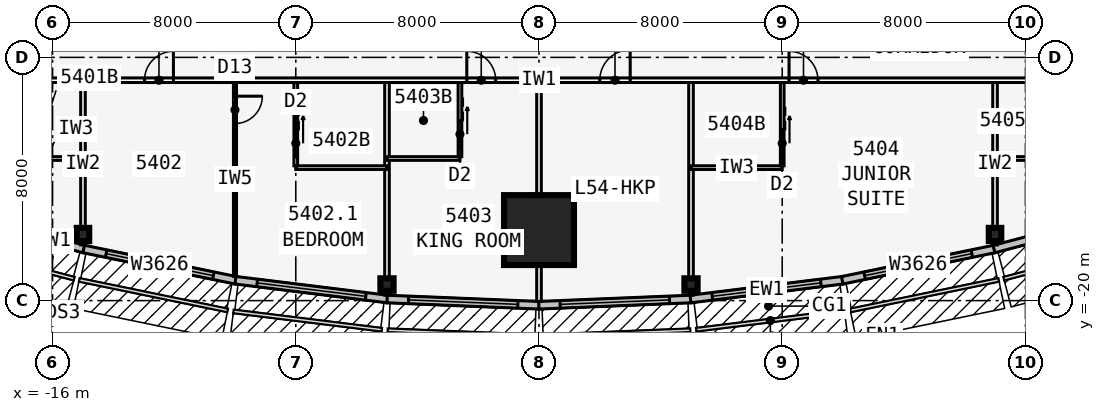
"""IFC4 building model, lengths in metres.
Left out: names, types, materials, properties, quantities, classifications, styles, units other than length and angle.
Written with IfcOpenShell. Run it as: python <this file> out.ifc"""

import sys

from ifc_helpers import new_model, si_unit, direction, frame, frame_2d, origin, origin_2d, place, context, subcontext, project, spatial, rectangle, i_section, extrude, element, fill, save


model = new_model("IFC4")
c1 = context("Model", 3, precision=1e-05, world=origin(), true_north=direction((0.0, 1.0)))
c2 = subcontext(c1, "Body", "Model", "MODEL_VIEW")
j1 = project(units=[si_unit("LENGTHUNIT", "METRE"), si_unit("PLANEANGLEUNIT", "RADIAN")], contexts=[c1])
p1 = place(None, origin())
s1 = spatial("IfcSite", under=j1, at=p1, CompositionType="ELEMENT")
p2 = place(p1, origin())
s2 = spatial("IfcBuilding", under=s1, at=p2, CompositionType="ELEMENT")
p3 = place(p2, frame((0.0, 0.0, 204.5)))
s3 = spatial("IfcBuildingStorey", under=s2, at=p3, CompositionType="ELEMENT", Elevation=204.5)
for number, where, z_axis, x_axis in (
    (1, (-15.0, -17.825, 0.0), (0.0, 0.0, 1.0), (1.0, 0.0, 0.0)),
    (2, (-5.0, -19.472, 0.0), (0.0, 0.0, 1.0), (0.0, -1.0, 0.0)),
    (3, (5.0, -19.472, 0.0), (0.0, 0.0, 1.0), (0.0, -1.0, 0.0)),
    (4, (15.0, -17.825, 0.0), (0.0, 0.0, 1.0), (1.0, 0.0, 0.0)),
):
    element("IfcColumn", number, at=place(p3, frame(where, z_axis=z_axis, x_axis=x_axis)), inside=s3, PredefinedType="COLUMN", context=c2, shape_type="SweptSolid", body=[
        extrude(i_section(OverallWidth=0.411, OverallDepth=0.434, WebThickness=0.036, FlangeThickness=0.057, at=origin_2d()), origin(), (0.0, 0.0, 1.0), 3.6),
    ])
p4 = place(p3, frame((0.0, -17.68, 0.0), z_axis=(0.0, 0.0, 1.0), x_axis=(0.0, -1.0, 0.0)))
e5 = element("IfcColumn", 5, at=p4, inside=s3, PredefinedType="COLUMN", context=c2, shape_type="SweptSolid", body=[
    extrude(rectangle(XDim=2.3, YDim=2.3, at=origin_2d()), origin(), (0.0, 0.0, 1.0), 3.6),
])
p5 = place(p3, frame((-16.968, -17.777, 0.0), z_axis=(0.0, 0.0, 1.0), x_axis=(0.967010286052, -0.254737328772, 0.0)))
e6 = element("IfcWall", 6, at=p5, inside=s3, PredefinedType="STANDARD", context=c2, shape_type="SweptSolid", body=[
    extrude(rectangle(XDim=2.068, YDim=0.25, at=frame_2d((1.034, 0.0))), origin(), (0.0, 0.0, 1.0), 3.435),
])
p6 = place(p3, frame((-14.975, -18.302, 0.0), z_axis=(0.0, 0.0, 1.0), x_axis=(0.979461488189, -0.201631329795, 0.0)))
e7 = element("IfcWall", 7, at=p6, inside=s3, PredefinedType="STANDARD", context=c2, shape_type="SweptSolid", body=[
    extrude(rectangle(XDim=5.105, YDim=0.25, at=frame_2d((2.552, 0.0))), origin(), (0.0, 0.0, 1.0), 3.435),
])
p7 = place(p6, frame((0.752, 0.0, 0.45)))
e8 = element("IfcOpeningElement", 8, at=p7, cuts=e7, PredefinedType="OPENING", context=c2, shape_type="SweptSolid", body=[
    extrude(rectangle(XDim=3.6, YDim=2.6, at=frame_2d((1.8, 1.3))), frame((0.0, 0.135, 0.0), z_axis=(0.0, -1.0, 0.0), x_axis=(1.0, 0.0, 0.0)), (0.0, 0.0, 1.0), 0.27),
])
p8 = place(p3, frame((-9.985, -19.33, 0.0), z_axis=(0.0, 0.0, 1.0), x_axis=(0.992449874964, -0.12265090984, 0.0)))
e9 = element("IfcWall", 9, at=p8, inside=s3, PredefinedType="STANDARD", context=c2, shape_type="SweptSolid", body=[
    extrude(rectangle(XDim=5.038, YDim=0.25, at=frame_2d((2.519, 0.0))), origin(), (0.0, 0.0, 1.0), 3.435),
])
p9 = place(p8, frame((0.719, 0.0, 0.45)))
e10 = element("IfcOpeningElement", 10, at=p9, cuts=e9, PredefinedType="OPENING", context=c2, shape_type="SweptSolid", body=[
    extrude(rectangle(XDim=3.6, YDim=2.6, at=frame_2d((1.8, 1.3))), frame((0.0, 0.135, 0.0), z_axis=(0.0, -1.0, 0.0), x_axis=(1.0, 0.0, 0.0)), (0.0, 0.0, 1.0), 0.27),
])
p10 = place(p3, frame((-4.995, -19.947, 0.0), z_axis=(0.0, 0.0, 1.0), x_axis=(0.999151909423, -0.041175986892, 0.0)))
e11 = element("IfcWall", 11, at=p10, inside=s3, PredefinedType="STANDARD", context=c2, shape_type="SweptSolid", body=[
    extrude(rectangle(XDim=5.004, YDim=0.25, at=frame_2d((2.502, 0.0))), origin(), (0.0, 0.0, 1.0), 3.435),
])
p11 = place(p10, frame((0.702, 0.0, 0.45)))
e12 = element("IfcOpeningElement", 12, at=p11, cuts=e11, PredefinedType="OPENING", context=c2, shape_type="SweptSolid", body=[
    extrude(rectangle(XDim=3.6, YDim=2.6, at=frame_2d((1.8, 1.3))), frame((0.0, 0.135, 0.0), z_axis=(0.0, -1.0, 0.0), x_axis=(1.0, 0.0, 0.0)), (0.0, 0.0, 1.0), 0.27),
])
p12 = place(p3, frame((-0.005, -20.153, 0.0), z_axis=(0.0, 0.0, 1.0), x_axis=(0.999151909423, 0.041175986892, 0.0)))
e13 = element("IfcWall", 13, at=p12, inside=s3, PredefinedType="STANDARD", context=c2, shape_type="SweptSolid", body=[
    extrude(rectangle(XDim=5.004, YDim=0.25, at=frame_2d((2.502, 0.0))), origin(), (0.0, 0.0, 1.0), 3.435),
])
p13 = place(p12, frame((0.702, 0.0, 0.45)))
e14 = element("IfcOpeningElement", 14, at=p13, cuts=e13, PredefinedType="OPENING", context=c2, shape_type="SweptSolid", body=[
    extrude(rectangle(XDim=3.6, YDim=2.6, at=frame_2d((1.8, 1.3))), frame((0.0, 0.135, 0.0), z_axis=(0.0, -1.0, 0.0), x_axis=(1.0, 0.0, 0.0)), (0.0, 0.0, 1.0), 0.27),
])
p14 = place(p3, frame((4.985, -19.948, 0.0), z_axis=(0.0, 0.0, 1.0), x_axis=(0.992449874964, 0.12265090984, 0.0)))
e15 = element("IfcWall", 15, at=p14, inside=s3, PredefinedType="STANDARD", context=c2, shape_type="SweptSolid", body=[
    extrude(rectangle(XDim=5.038, YDim=0.25, at=frame_2d((2.519, 0.0))), origin(), (0.0, 0.0, 1.0), 3.435),
])
p15 = place(p14, frame((0.719, 0.0, 0.45)))
e16 = element("IfcOpeningElement", 16, at=p15, cuts=e15, PredefinedType="OPENING", context=c2, shape_type="SweptSolid", body=[
    extrude(rectangle(XDim=3.6, YDim=2.6, at=frame_2d((1.8, 1.3))), frame((0.0, 0.135, 0.0), z_axis=(0.0, -1.0, 0.0), x_axis=(1.0, 0.0, 0.0)), (0.0, 0.0, 1.0), 0.27),
])
p16 = place(p3, frame((9.975, -19.332, 0.0), z_axis=(0.0, 0.0, 1.0), x_axis=(0.979461488189, 0.201631329795, 0.0)))
e17 = element("IfcWall", 17, at=p16, inside=s3, PredefinedType="STANDARD", context=c2, shape_type="SweptSolid", body=[
    extrude(rectangle(XDim=5.105, YDim=0.25, at=frame_2d((2.552, 0.0))), origin(), (0.0, 0.0, 1.0), 3.435),
])
p17 = place(p16, frame((0.752, 0.0, 0.45)))
e18 = element("IfcOpeningElement", 18, at=p17, cuts=e17, PredefinedType="OPENING", context=c2, shape_type="SweptSolid", body=[
    extrude(rectangle(XDim=3.6, YDim=2.6, at=frame_2d((1.8, 1.3))), frame((0.0, 0.135, 0.0), z_axis=(0.0, -1.0, 0.0), x_axis=(1.0, 0.0, 0.0)), (0.0, 0.0, 1.0), 0.27),
])
p18 = place(p3, frame((14.968, -18.304, 0.0), z_axis=(0.0, 0.0, 1.0), x_axis=(0.967010286052, 0.254737328772, 0.0)))
e19 = element("IfcWall", 19, at=p18, inside=s3, PredefinedType="STANDARD", context=c2, shape_type="SweptSolid", body=[
    extrude(rectangle(XDim=2.068, YDim=0.25, at=frame_2d((1.034, 0.0))), origin(), (0.0, 0.0, 1.0), 3.435),
])
p19 = place(p3, frame((-21.236, -12.751, 0.0), z_axis=(0.0, 0.0, 1.0), x_axis=(1.0, 0.0, 0.0)))
e20 = element("IfcWall", 20, at=p19, inside=s3, PredefinedType="PARTITIONING", context=c2, shape_type="SweptSolid", body=[
    extrude(rectangle(XDim=42.472, YDim=0.15, at=frame_2d((21.236, 0.0))), origin(), (0.0, 0.0, 1.0), 3.435),
])
p20 = place(p19, frame((2.661, 0.0, 0.0)))
e21 = element("IfcOpeningElement", 21, at=p20, cuts=e20, PredefinedType="OPENING", context=c2, shape_type="SweptSolid", body=[
    extrude(rectangle(XDim=0.95, YDim=2.13, at=frame_2d((0.475, 1.065))), frame((0.0, 0.085, 0.0), z_axis=(0.0, -1.0, 0.0), x_axis=(1.0, 0.0, 0.0)), (0.0, 0.0, 1.0), 0.17),
])
p21 = place(p19, frame((8.261, 0.0, 0.0)))
e22 = element("IfcOpeningElement", 22, at=p21, cuts=e20, PredefinedType="OPENING", context=c2, shape_type="SweptSolid", body=[
    extrude(rectangle(XDim=0.95, YDim=2.13, at=frame_2d((0.475, 1.065))), frame((0.0, 0.085, 0.0), z_axis=(0.0, -1.0, 0.0), x_axis=(1.0, 0.0, 0.0)), (0.0, 0.0, 1.0), 0.17),
])
p22 = place(p19, frame((18.861, 0.0, 0.0)))
e23 = element("IfcOpeningElement", 23, at=p22, cuts=e20, PredefinedType="OPENING", context=c2, shape_type="SweptSolid", body=[
    extrude(rectangle(XDim=0.95, YDim=2.13, at=frame_2d((0.475, 1.065))), frame((0.0, 0.085, 0.0), z_axis=(0.0, -1.0, 0.0), x_axis=(1.0, 0.0, 0.0)), (0.0, 0.0, 1.0), 0.17),
])
p23 = place(p19, frame((23.236, 0.0, 0.0)))
e24 = element("IfcOpeningElement", 24, at=p23, cuts=e20, PredefinedType="OPENING", context=c2, shape_type="SweptSolid", body=[
    extrude(rectangle(XDim=1.0, YDim=2.13, at=frame_2d((0.5, 1.065))), frame((0.0, 0.085, 0.0), z_axis=(0.0, -1.0, 0.0), x_axis=(1.0, 0.0, 0.0)), (0.0, 0.0, 1.0), 0.17),
])
p24 = place(p19, frame((29.461, 0.0, 0.0)))
e25 = element("IfcOpeningElement", 25, at=p24, cuts=e20, PredefinedType="OPENING", context=c2, shape_type="SweptSolid", body=[
    extrude(rectangle(XDim=0.95, YDim=2.13, at=frame_2d((0.475, 1.065))), frame((0.0, 0.085, 0.0), z_axis=(0.0, -1.0, 0.0), x_axis=(1.0, 0.0, 0.0)), (0.0, 0.0, 1.0), 0.17),
])
p25 = place(p19, frame((38.861, 0.0, 0.0)))
e26 = element("IfcOpeningElement", 26, at=p25, cuts=e20, PredefinedType="OPENING", context=c2, shape_type="SweptSolid", body=[
    extrude(rectangle(XDim=0.95, YDim=2.13, at=frame_2d((0.475, 1.065))), frame((0.0, 0.085, 0.0), z_axis=(0.0, -1.0, 0.0), x_axis=(1.0, 0.0, 0.0)), (0.0, 0.0, 1.0), 0.17),
])
p26 = place(p3, frame((-15.0, -12.826, 0.0), z_axis=(0.0, 0.0, 1.0), x_axis=(0.0, -1.0, 0.0)))
e27 = element("IfcWall", 27, at=p26, inside=s3, PredefinedType="PARTITIONING", context=c2, shape_type="SweptSolid", body=[
    extrude(rectangle(XDim=5.34, YDim=0.15, at=frame_2d((2.67, 0.0))), origin(), (0.0, 0.0, 1.0), 2.589),
])
p27 = place(p3, frame((-10.0, -12.826, 0.0), z_axis=(0.0, 0.0, 1.0), x_axis=(0.0, -1.0, 0.0)))
e28 = element("IfcWall", 28, at=p27, inside=s3, PredefinedType="PARTITIONING", context=c2, shape_type="SweptSolid", body=[
    extrude(rectangle(XDim=6.373, YDim=0.1, at=frame_2d((3.187, 0.0))), origin(), (0.0, 0.0, 1.0), 2.589),
])
p28 = place(p27, frame((0.45, 0.0, 0.0)))
e29 = element("IfcOpeningElement", 29, at=p28, cuts=e28, PredefinedType="OPENING", context=c2, shape_type="SweptSolid", body=[
    extrude(rectangle(XDim=0.9, YDim=2.13, at=frame_2d((0.45, 1.065))), frame((0.0, 0.06, 0.0), z_axis=(0.0, -1.0, 0.0), x_axis=(1.0, 0.0, 0.0)), (0.0, 0.0, 1.0), 0.12),
])
p29 = place(p3, frame((-5.0, -12.826, 0.0), z_axis=(0.0, 0.0, 1.0), x_axis=(0.0, -1.0, 0.0)))
e30 = element("IfcWall", 30, at=p29, inside=s3, PredefinedType="PARTITIONING", context=c2, shape_type="SweptSolid", body=[
    extrude(rectangle(XDim=6.994, YDim=0.15, at=frame_2d((3.497, 0.0))), origin(), (0.0, 0.0, 1.0), 2.589),
])
p30 = place(p3, frame((0.0, -12.826, 0.0), z_axis=(0.0, 0.0, 1.0), x_axis=(0.0, -1.0, 0.0)))
e31 = element("IfcWall", 31, at=p30, inside=s3, PredefinedType="PARTITIONING", context=c2, shape_type="SweptSolid", body=[
    extrude(rectangle(XDim=7.201, YDim=0.15, at=frame_2d((3.601, 0.0))), origin(), (0.0, 0.0, 1.0), 2.589),
])
p31 = place(p3, frame((5.0, -12.826, 0.0), z_axis=(0.0, 0.0, 1.0), x_axis=(0.0, -1.0, 0.0)))
e32 = element("IfcWall", 32, at=p31, inside=s3, PredefinedType="PARTITIONING", context=c2, shape_type="SweptSolid", body=[
    extrude(rectangle(XDim=6.994, YDim=0.15, at=frame_2d((3.497, 0.0))), origin(), (0.0, 0.0, 1.0), 2.589),
])
p32 = place(p3, frame((15.0, -12.826, 0.0), z_axis=(0.0, 0.0, 1.0), x_axis=(0.0, -1.0, 0.0)))
e33 = element("IfcWall", 33, at=p32, inside=s3, PredefinedType="PARTITIONING", context=c2, shape_type="SweptSolid", body=[
    extrude(rectangle(XDim=5.34, YDim=0.15, at=frame_2d((2.67, 0.0))), origin(), (0.0, 0.0, 1.0), 2.589),
])
p33 = place(p3, frame((-17.4, -15.326, 0.0), z_axis=(0.0, 0.0, 1.0), x_axis=(1.0, 0.0, 0.0)))
e34 = element("IfcWall", 34, at=p33, inside=s3, PredefinedType="PLUMBINGWALL", context=c2, shape_type="SweptSolid", body=[
    extrude(rectangle(XDim=2.4, YDim=0.12, at=frame_2d((1.2, 0.0))), origin(), (0.0, 0.0, 1.0), 3.435),
])
p34 = place(p3, frame((-8.0, -15.626, 0.0), z_axis=(0.0, 0.0, 1.0), x_axis=(1.0, 0.0, 0.0)))
e35 = element("IfcWall", 35, at=p34, inside=s3, PredefinedType="PLUMBINGWALL", context=c2, shape_type="SweptSolid", body=[
    extrude(rectangle(XDim=3.0, YDim=0.12, at=frame_2d((1.5, 0.0))), origin(), (0.0, 0.0, 1.0), 3.435),
])
p35 = place(p3, frame((-8.0, -12.826, 0.0), z_axis=(0.0, 0.0, 1.0), x_axis=(0.0, -1.0, 0.0)))
e36 = element("IfcWall", 36, at=p35, inside=s3, PredefinedType="PLUMBINGWALL", context=c2, shape_type="SweptSolid", body=[
    extrude(rectangle(XDim=2.74, YDim=0.12, at=frame_2d((1.37, 0.0))), origin(), (0.0, 0.0, 1.0), 3.435),
])
p36 = place(p35, frame((1.55, 0.0, 0.0)))
e37 = element("IfcOpeningElement", 37, at=p36, cuts=e36, PredefinedType="OPENING", context=c2, shape_type="SweptSolid", body=[
    extrude(rectangle(XDim=0.9, YDim=2.13, at=frame_2d((0.45, 1.065))), frame((0.0, 0.07, 0.0), z_axis=(0.0, -1.0, 0.0), x_axis=(1.0, 0.0, 0.0)), (0.0, 0.0, 1.0), 0.14),
])
p37 = place(p3, frame((-5.0, -15.326, 0.0), z_axis=(0.0, 0.0, 1.0), x_axis=(1.0, 0.0, 0.0)))
e38 = element("IfcWall", 38, at=p37, inside=s3, PredefinedType="PLUMBINGWALL", context=c2, shape_type="SweptSolid", body=[
    extrude(rectangle(XDim=2.4, YDim=0.12, at=frame_2d((1.2, 0.0))), origin(), (0.0, 0.0, 1.0), 3.435),
])
p38 = place(p3, frame((-2.6, -12.826, 0.0), z_axis=(0.0, 0.0, 1.0), x_axis=(0.0, -1.0, 0.0)))
e39 = element("IfcWall", 39, at=p38, inside=s3, PredefinedType="PLUMBINGWALL", context=c2, shape_type="SweptSolid", body=[
    extrude(rectangle(XDim=2.44, YDim=0.12, at=frame_2d((1.22, 0.0))), origin(), (0.0, 0.0, 1.0), 3.435),
])
p39 = place(p38, frame((1.25, 0.0, 0.0)))
e40 = element("IfcOpeningElement", 40, at=p39, cuts=e39, PredefinedType="OPENING", context=c2, shape_type="SweptSolid", body=[
    extrude(rectangle(XDim=0.9, YDim=2.13, at=frame_2d((0.45, 1.065))), frame((0.0, 0.07, 0.0), z_axis=(0.0, -1.0, 0.0), x_axis=(1.0, 0.0, 0.0)), (0.0, 0.0, 1.0), 0.14),
])
p40 = place(p3, frame((5.0, -15.626, 0.0), z_axis=(0.0, 0.0, 1.0), x_axis=(1.0, 0.0, 0.0)))
e41 = element("IfcWall", 41, at=p40, inside=s3, PredefinedType="PLUMBINGWALL", context=c2, shape_type="SweptSolid", body=[
    extrude(rectangle(XDim=3.0, YDim=0.12, at=frame_2d((1.5, 0.0))), origin(), (0.0, 0.0, 1.0), 3.435),
])
p41 = place(p3, frame((8.0, -12.826, 0.0), z_axis=(0.0, 0.0, 1.0), x_axis=(0.0, -1.0, 0.0)))
e42 = element("IfcWall", 42, at=p41, inside=s3, PredefinedType="PLUMBINGWALL", context=c2, shape_type="SweptSolid", body=[
    extrude(rectangle(XDim=2.74, YDim=0.12, at=frame_2d((1.37, 0.0))), origin(), (0.0, 0.0, 1.0), 3.435),
])
p42 = place(p41, frame((1.55, 0.0, 0.0)))
e43 = element("IfcOpeningElement", 43, at=p42, cuts=e42, PredefinedType="OPENING", context=c2, shape_type="SweptSolid", body=[
    extrude(rectangle(XDim=0.9, YDim=2.13, at=frame_2d((0.45, 1.065))), frame((0.0, 0.07, 0.0), z_axis=(0.0, -1.0, 0.0), x_axis=(1.0, 0.0, 0.0)), (0.0, 0.0, 1.0), 0.14),
])
p43 = place(p3, frame((15.0, -15.326, 0.0), z_axis=(0.0, 0.0, 1.0), x_axis=(1.0, 0.0, 0.0)))
e44 = element("IfcWall", 44, at=p43, inside=s3, PredefinedType="PLUMBINGWALL", context=c2, shape_type="SweptSolid", body=[
    extrude(rectangle(XDim=2.4, YDim=0.12, at=frame_2d((1.2, 0.0))), origin(), (0.0, 0.0, 1.0), 3.435),
])
p44 = place(p7, origin())
e45 = element("IfcWindow", 45, at=p44, inside=s3, PartitioningType="SINGLE_PANEL", PredefinedType="WINDOW", context=c2, shape_type="SweptSolid", body=[
    extrude(rectangle(XDim=3.6, YDim=2.6, at=frame_2d((1.8, 1.3))), frame((0.0, 0.03, 0.0), z_axis=(0.0, -1.0, 0.0), x_axis=(1.0, 0.0, 0.0)), (0.0, 0.0, 1.0), 0.06),
])
fill(e8, e45)
p45 = place(p9, origin())
e46 = element("IfcWindow", 46, at=p45, inside=s3, PartitioningType="SINGLE_PANEL", PredefinedType="WINDOW", context=c2, shape_type="SweptSolid", body=[
    extrude(rectangle(XDim=3.6, YDim=2.6, at=frame_2d((1.8, 1.3))), frame((0.0, 0.03, 0.0), z_axis=(0.0, -1.0, 0.0), x_axis=(1.0, 0.0, 0.0)), (0.0, 0.0, 1.0), 0.06),
])
fill(e10, e46)
p46 = place(p11, origin())
e47 = element("IfcWindow", 47, at=p46, inside=s3, PartitioningType="SINGLE_PANEL", PredefinedType="WINDOW", context=c2, shape_type="SweptSolid", body=[
    extrude(rectangle(XDim=3.6, YDim=2.6, at=frame_2d((1.8, 1.3))), frame((0.0, 0.03, 0.0), z_axis=(0.0, -1.0, 0.0), x_axis=(1.0, 0.0, 0.0)), (0.0, 0.0, 1.0), 0.06),
])
fill(e12, e47)
p47 = place(p13, origin())
e48 = element("IfcWindow", 48, at=p47, inside=s3, PartitioningType="SINGLE_PANEL", PredefinedType="WINDOW", context=c2, shape_type="SweptSolid", body=[
    extrude(rectangle(XDim=3.6, YDim=2.6, at=frame_2d((1.8, 1.3))), frame((0.0, 0.03, 0.0), z_axis=(0.0, -1.0, 0.0), x_axis=(1.0, 0.0, 0.0)), (0.0, 0.0, 1.0), 0.06),
])
fill(e14, e48)
p48 = place(p15, origin())
e49 = element("IfcWindow", 49, at=p48, inside=s3, PartitioningType="SINGLE_PANEL", PredefinedType="WINDOW", context=c2, shape_type="SweptSolid", body=[
    extrude(rectangle(XDim=3.6, YDim=2.6, at=frame_2d((1.8, 1.3))), frame((0.0, 0.03, 0.0), z_axis=(0.0, -1.0, 0.0), x_axis=(1.0, 0.0, 0.0)), (0.0, 0.0, 1.0), 0.06),
])
fill(e16, e49)
p49 = place(p17, origin())
e50 = element("IfcWindow", 50, at=p49, inside=s3, PartitioningType="SINGLE_PANEL", PredefinedType="WINDOW", context=c2, shape_type="SweptSolid", body=[
    extrude(rectangle(XDim=3.6, YDim=2.6, at=frame_2d((1.8, 1.3))), frame((0.0, 0.03, 0.0), z_axis=(0.0, -1.0, 0.0), x_axis=(1.0, 0.0, 0.0)), (0.0, 0.0, 1.0), 0.06),
])
fill(e18, e50)
p50 = place(p28, origin())
e51 = element("IfcDoor", 51, at=p50, inside=s3, OperationType="SINGLE_SWING_LEFT", PredefinedType="DOOR", context=c2, shape_type="SweptSolid", body=[
    extrude(rectangle(XDim=0.9, YDim=2.13, at=frame_2d((0.45, 1.065))), frame((0.0, 0.025, 0.0), z_axis=(0.0, -1.0, 0.0), x_axis=(1.0, 0.0, 0.0)), (0.0, 0.0, 1.0), 0.05),
])
fill(e29, e51)
p51 = place(p21, origin())
e52 = element("IfcDoor", 52, at=p51, inside=s3, OperationType="SINGLE_SWING_RIGHT", PredefinedType="DOOR", context=c2, shape_type="SweptSolid", body=[
    extrude(rectangle(XDim=0.95, YDim=2.13, at=frame_2d((0.475, 1.065))), frame((0.0, 0.025, 0.0), z_axis=(0.0, -1.0, 0.0), x_axis=(1.0, 0.0, 0.0)), (0.0, 0.0, 1.0), 0.05),
])
fill(e22, e52)
p52 = place(p36, origin())
e53 = element("IfcDoor", 53, at=p52, inside=s3, OperationType="SLIDING_TO_LEFT", PredefinedType="DOOR", context=c2, shape_type="SweptSolid", body=[
    extrude(rectangle(XDim=0.9, YDim=2.13, at=frame_2d((0.45, 1.065))), frame((0.0, 0.025, 0.0), z_axis=(0.0, -1.0, 0.0), x_axis=(1.0, 0.0, 0.0)), (0.0, 0.0, 1.0), 0.05),
])
fill(e37, e53)
p53 = place(p39, origin())
e54 = element("IfcDoor", 54, at=p53, inside=s3, OperationType="SLIDING_TO_LEFT", PredefinedType="DOOR", context=c2, shape_type="SweptSolid", body=[
    extrude(rectangle(XDim=0.9, YDim=2.13, at=frame_2d((0.45, 1.065))), frame((0.0, 0.025, 0.0), z_axis=(0.0, -1.0, 0.0), x_axis=(1.0, 0.0, 0.0)), (0.0, 0.0, 1.0), 0.05),
])
fill(e40, e54)
p54 = place(p22, origin())
e55 = element("IfcDoor", 55, at=p54, inside=s3, OperationType="SINGLE_SWING_LEFT", PredefinedType="DOOR", context=c2, shape_type="SweptSolid", body=[
    extrude(rectangle(XDim=0.95, YDim=2.13, at=frame_2d((0.475, 1.065))), frame((0.0, 0.025, 0.0), z_axis=(0.0, -1.0, 0.0), x_axis=(1.0, 0.0, 0.0)), (0.0, 0.0, 1.0), 0.05),
])
fill(e23, e55)
p55 = place(p23, origin())
e56 = element("IfcDoor", 56, at=p55, inside=s3, OperationType="SINGLE_SWING_RIGHT", PredefinedType="DOOR", context=c2, shape_type="SweptSolid", body=[
    extrude(rectangle(XDim=1.0, YDim=2.13, at=frame_2d((0.5, 1.065))), frame((0.0, 0.025, 0.0), z_axis=(0.0, -1.0, 0.0), x_axis=(1.0, 0.0, 0.0)), (0.0, 0.0, 1.0), 0.05),
])
fill(e24, e56)
p56 = place(p42, origin())
e57 = element("IfcDoor", 57, at=p56, inside=s3, OperationType="SLIDING_TO_LEFT", PredefinedType="DOOR", context=c2, shape_type="SweptSolid", body=[
    extrude(rectangle(XDim=0.9, YDim=2.13, at=frame_2d((0.45, 1.065))), frame((0.0, 0.025, 0.0), z_axis=(0.0, -1.0, 0.0), x_axis=(1.0, 0.0, 0.0)), (0.0, 0.0, 1.0), 0.05),
])
fill(e43, e57)
p57 = place(p24, origin())
e58 = element("IfcDoor", 58, at=p57, inside=s3, OperationType="SINGLE_SWING_LEFT", PredefinedType="DOOR", context=c2, shape_type="SweptSolid", body=[
    extrude(rectangle(XDim=0.95, YDim=2.13, at=frame_2d((0.475, 1.065))), frame((0.0, 0.025, 0.0), z_axis=(0.0, -1.0, 0.0), x_axis=(1.0, 0.0, 0.0)), (0.0, 0.0, 1.0), 0.05),
])
fill(e25, e58)
save(model, sys.argv[1])
